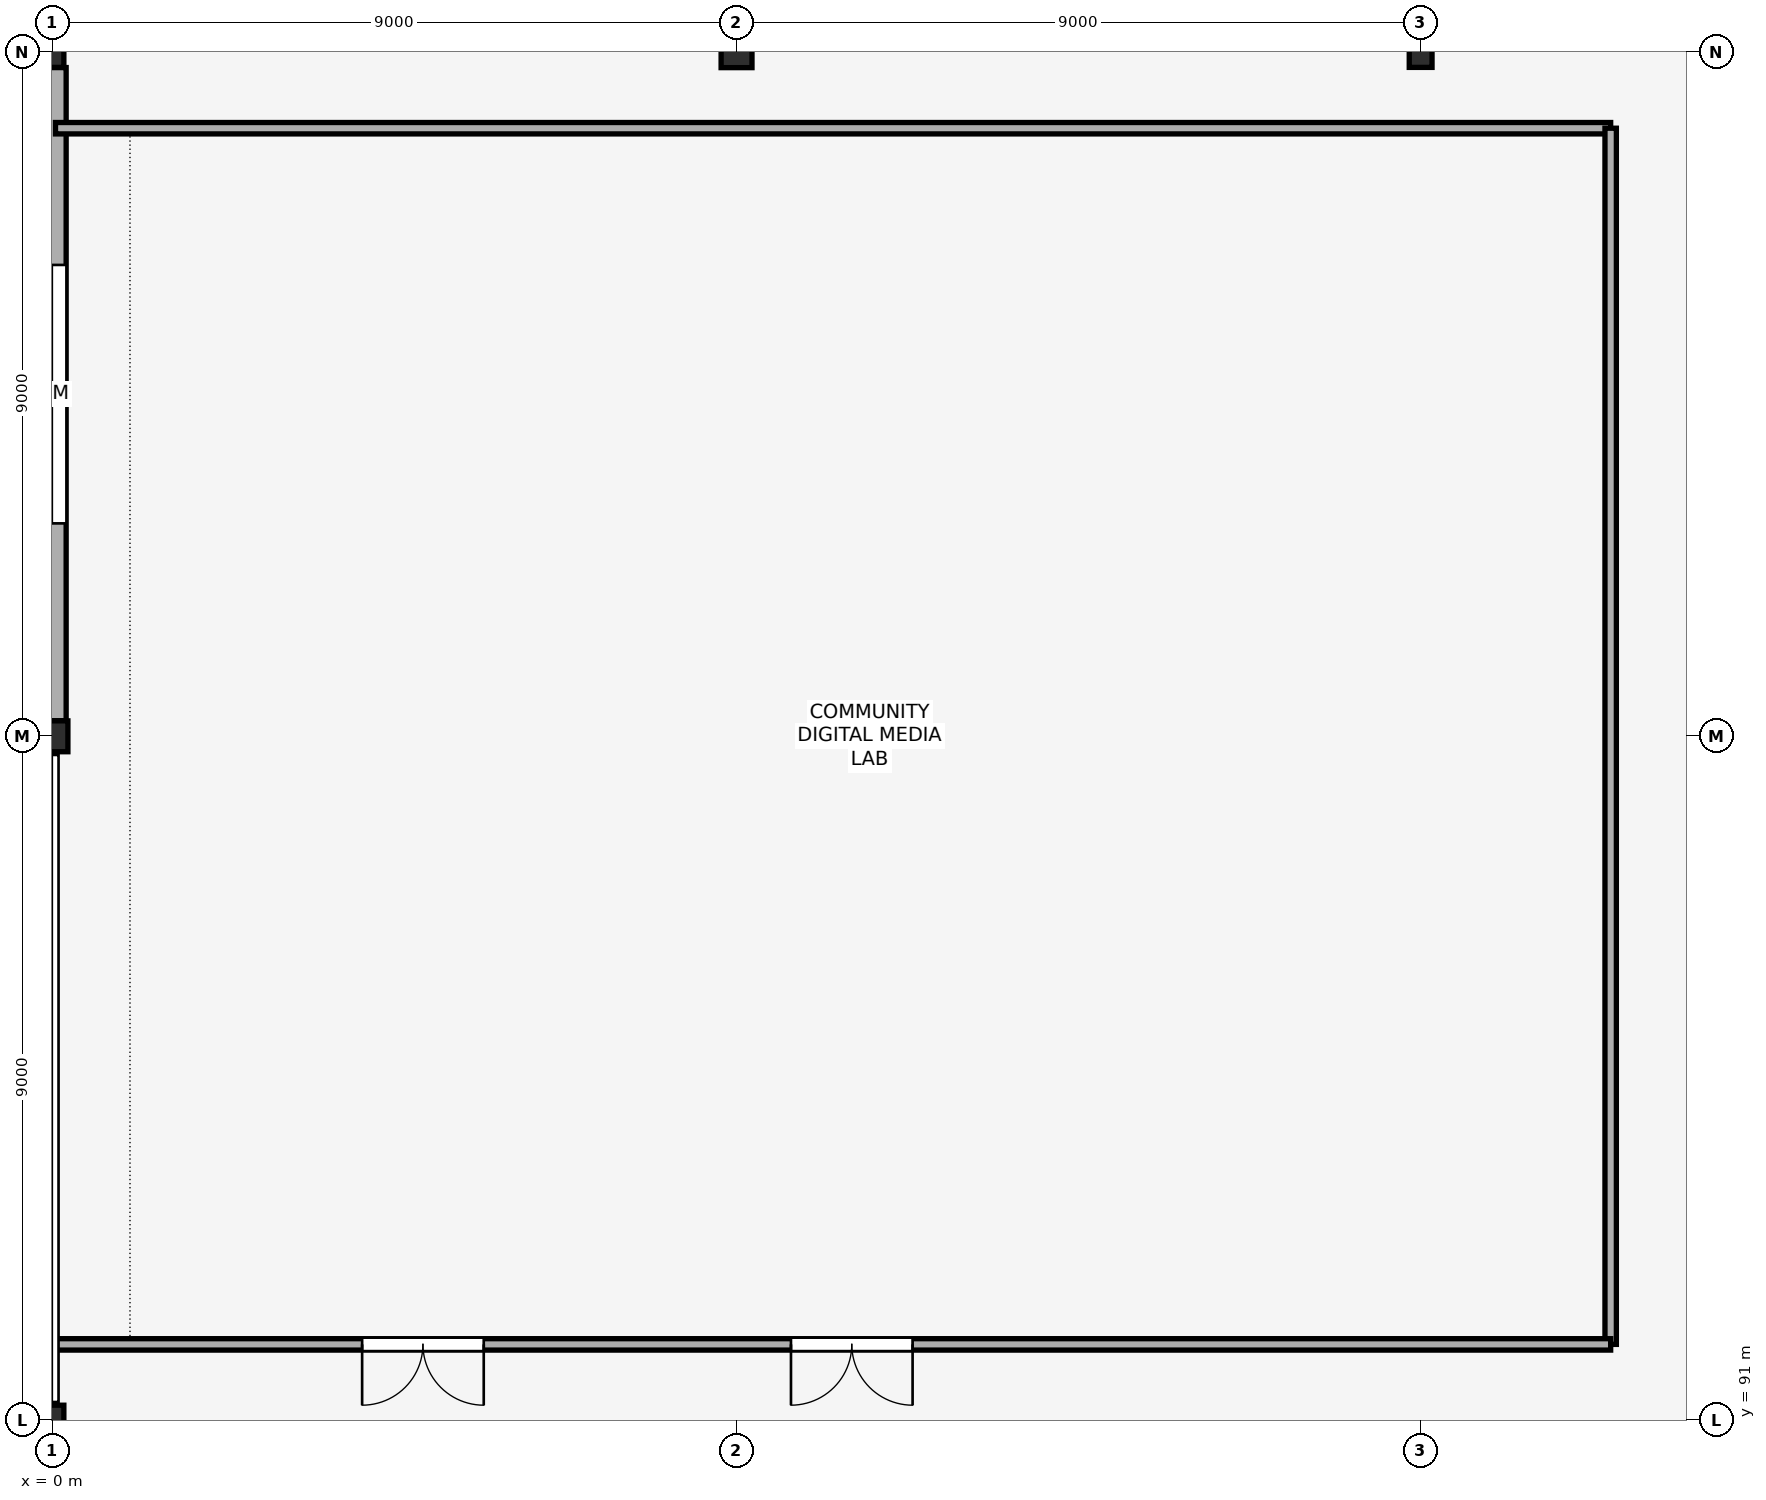
"""IFC4 building model, lengths in metres.
Left out: names, types, materials, properties, quantities, classifications, styles, units other than length and angle.
Written with IfcOpenShell. Run it as: python <this file> out.ifc"""

import sys

from ifc_helpers import new_model, si_unit, direction, frame, frame_2d, origin, origin_2d, place, context, subcontext, project, spatial, rectangle, hollow_circle, i_section, extrude, element, fill, save


model = new_model("IFC4")
c1 = context("Model", 3, precision=1e-05, world=origin(), true_north=direction((0.0, 1.0)))
c2 = subcontext(c1, "Body", "Model", "MODEL_VIEW")
j1 = project(units=[si_unit("LENGTHUNIT", "METRE"), si_unit("PLANEANGLEUNIT", "RADIAN")], contexts=[c1])
p1 = place(None, origin())
s1 = spatial("IfcSite", under=j1, at=p1, CompositionType="ELEMENT")
p2 = place(p1, origin())
s2 = spatial("IfcBuilding", under=s1, at=p2, CompositionType="ELEMENT")
p3 = place(p2, frame((0.0, 0.0, 10.2)))
s3 = spatial("IfcBuildingStorey", under=s2, at=p3, CompositionType="ELEMENT", Elevation=10.2)
p4 = place(p3, frame((0.0, 91.0, 0.0), z_axis=(0.0, 0.0, 1.0), x_axis=(1.0, 0.0, 0.0)))
e1 = element("IfcColumn", 1, at=p4, inside=s3, PredefinedType="COLUMN", context=c2, shape_type="SweptSolid", body=[
    extrude(i_section(OverallWidth=0.3, OverallDepth=0.4, WebThickness=0.013, FlangeThickness=0.024, FilletRadius=0.027, at=origin_2d()), origin(), (0.0, 0.0, 1.0), 4.8),
])
p5 = place(p3, frame((0.0, 100.0, 0.0), z_axis=(0.0, 0.0, 1.0), x_axis=(1.0, 0.0, 0.0)))
e2 = element("IfcColumn", 2, at=p5, inside=s3, PredefinedType="COLUMN", context=c2, shape_type="SweptSolid", body=[
    extrude(hollow_circle(Radius=0.203, WallThickness=0.016, at=origin_2d()), origin(), (0.0, 0.0, 1.0), 4.8),
])
p6 = place(p3, frame((0.0, 109.0, 0.0), z_axis=(0.0, 0.0, 1.0), x_axis=(1.0, 0.0, 0.0)))
e3 = element("IfcColumn", 3, at=p6, inside=s3, PredefinedType="COLUMN", context=c2, shape_type="SweptSolid", body=[
    extrude(i_section(OverallWidth=0.3, OverallDepth=0.4, WebThickness=0.013, FlangeThickness=0.024, FilletRadius=0.027, at=origin_2d()), origin(), (0.0, 0.0, 1.0), 4.8),
])
p7 = place(p3, frame((9.0, 109.0, 0.0), z_axis=(0.0, 0.0, 1.0), x_axis=(1.0, 0.0, 0.0)))
e4 = element("IfcColumn", 4, at=p7, inside=s3, PredefinedType="COLUMN", context=c2, shape_type="SweptSolid", body=[
    extrude(hollow_circle(Radius=0.203, WallThickness=0.016, at=origin_2d()), origin(), (0.0, 0.0, 1.0), 4.8),
])
p8 = place(p3, frame((18.0, 109.0, 0.0), z_axis=(0.0, 0.0, 1.0), x_axis=(1.0, 0.0, 0.0)))
e5 = element("IfcColumn", 5, at=p8, inside=s3, PredefinedType="COLUMN", context=c2, shape_type="SweptSolid", body=[
    extrude(i_section(OverallWidth=0.3, OverallDepth=0.4, WebThickness=0.013, FlangeThickness=0.024, FilletRadius=0.027, at=origin_2d()), origin(), (0.0, 0.0, 1.0), 4.8),
])
p9 = place(p3, frame((0.0, 100.205, 0.0), z_axis=(0.0, 0.0, 1.0), x_axis=(0.0, 1.0, 0.0)))
e6 = element("IfcWall", 6, at=p9, inside=s3, PredefinedType="STANDARD", context=c2, shape_type="SweptSolid", body=[
    extrude(rectangle(XDim=8.593, YDim=0.36, at=frame_2d((4.296, 0.0))), origin(), (0.0, 0.0, 1.0), 4.215),
])
p10 = place(p9, frame((2.596, 0.0, 0.9)))
e7 = element("IfcOpeningElement", 7, at=p10, cuts=e6, PredefinedType="OPENING", context=c2, shape_type="SweptSolid", body=[
    extrude(rectangle(XDim=3.4, YDim=2.0, at=frame_2d((1.7, 1.0))), frame((0.0, 0.19, 0.0), z_axis=(0.0, -1.0, 0.0), x_axis=(1.0, 0.0, 0.0)), (0.0, 0.0, 1.0), 0.38),
])
p11 = place(p3, frame((0.04, 108.0, 0.0), z_axis=(0.0, 0.0, 1.0), x_axis=(1.0, 0.0, 0.0)))
e8 = element("IfcWall", 8, at=p11, inside=s3, PredefinedType="PARTITIONING", context=c2, shape_type="SweptSolid", body=[
    extrude(rectangle(XDim=20.46, YDim=0.15, at=frame_2d((10.23, 0.0))), origin(), (0.0, 0.0, 1.0), 4.52),
])
p12 = place(p3, frame((20.5, 108.0, 0.0), z_axis=(0.0, 0.0, 1.0), x_axis=(0.0, -1.0, 0.0)))
e9 = element("IfcWall", 9, at=p12, inside=s3, PredefinedType="PARTITIONING", context=c2, shape_type="SweptSolid", body=[
    extrude(rectangle(XDim=16.0, YDim=0.15, at=frame_2d((8.0, 0.0))), origin(), (0.0, 0.0, 1.0), 4.52),
])
p13 = place(p3, frame((20.5, 92.0, 0.0), z_axis=(0.0, 0.0, 1.0), x_axis=(-1.0, 0.0, 0.0)))
e10 = element("IfcWall", 10, at=p13, inside=s3, PredefinedType="PARTITIONING", context=c2, shape_type="SweptSolid", body=[
    extrude(rectangle(XDim=20.48, YDim=0.15, at=frame_2d((10.24, 0.0))), origin(), (0.0, 0.0, 1.0), 4.52),
])
p14 = place(p13, frame((14.826, 0.0, 0.0)))
e11 = element("IfcOpeningElement", 11, at=p14, cuts=e10, PredefinedType="OPENING", context=c2, shape_type="SweptSolid", body=[
    extrude(rectangle(XDim=1.6, YDim=2.2, at=frame_2d((0.8, 1.1))), frame((0.0, 0.085, 0.0), z_axis=(0.0, -1.0, 0.0), x_axis=(1.0, 0.0, 0.0)), (0.0, 0.0, 1.0), 0.17),
])
p15 = place(p13, frame((9.184, 0.0, 0.0)))
e12 = element("IfcOpeningElement", 12, at=p15, cuts=e10, PredefinedType="OPENING", context=c2, shape_type="SweptSolid", body=[
    extrude(rectangle(XDim=1.6, YDim=2.2, at=frame_2d((0.8, 1.1))), frame((0.0, 0.085, 0.0), z_axis=(0.0, -1.0, 0.0), x_axis=(1.0, 0.0, 0.0)), (0.0, 0.0, 1.0), 0.17),
])
p16 = place(p10, origin())
e13 = element("IfcWindow", 13, at=p16, inside=s3, PartitioningType="SINGLE_PANEL", PredefinedType="WINDOW", context=c2, shape_type="SweptSolid", body=[
    extrude(rectangle(XDim=3.4, YDim=2.0, at=frame_2d((1.7, 1.0))), frame((0.0, 0.03, 0.0), z_axis=(0.0, -1.0, 0.0), x_axis=(1.0, 0.0, 0.0)), (0.0, 0.0, 1.0), 0.06),
])
fill(e7, e13)
p17 = place(p14, origin())
e14 = element("IfcDoor", 14, at=p17, inside=s3, OperationType="DOUBLE_DOOR_SINGLE_SWING", PredefinedType="DOOR", context=c2, shape_type="SweptSolid", body=[
    extrude(rectangle(XDim=1.6, YDim=2.2, at=frame_2d((0.8, 1.1))), frame((0.0, 0.025, 0.0), z_axis=(0.0, -1.0, 0.0), x_axis=(1.0, 0.0, 0.0)), (0.0, 0.0, 1.0), 0.05),
])
fill(e11, e14)
p18 = place(p15, origin())
e15 = element("IfcDoor", 15, at=p18, inside=s3, OperationType="DOUBLE_DOOR_SINGLE_SWING", PredefinedType="DOOR", context=c2, shape_type="SweptSolid", body=[
    extrude(rectangle(XDim=1.6, YDim=2.2, at=frame_2d((0.8, 1.1))), frame((0.0, 0.025, 0.0), z_axis=(0.0, -1.0, 0.0), x_axis=(1.0, 0.0, 0.0)), (0.0, 0.0, 1.0), 0.05),
])
fill(e12, e15)
save(model, sys.argv[1])
